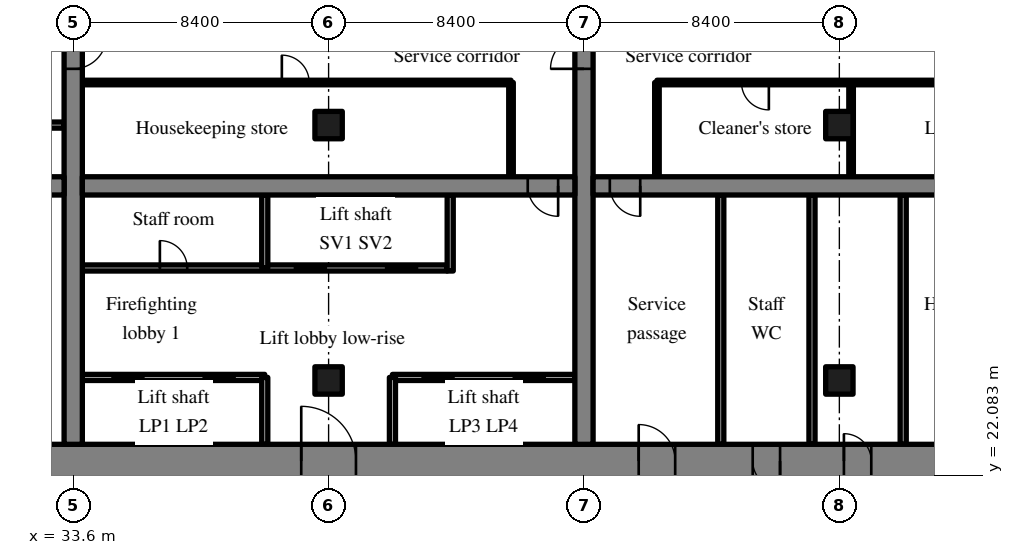
"""IFC4 building model, lengths in metres.
Left out: names, types, materials, properties, quantities, classifications, styles, units other than length and angle.
Written with IfcOpenShell. Run it as: python <this file> out.ifc"""

import sys

from ifc_helpers import new_model, si_unit, direction, frame, frame_2d, origin, origin_2d, place, context, subcontext, project, spatial, rectangle, extrude, source, transform, mapped, element, fill, save


model = new_model("IFC4")
c1 = context("Model", 3, precision=1e-05, world=origin(), true_north=direction((0.0, 1.0)))
c2 = subcontext(c1, "Body", "Model", "MODEL_VIEW")
j1 = project(units=[si_unit("LENGTHUNIT", "METRE"), si_unit("PLANEANGLEUNIT", "RADIAN")], contexts=[c1])
p1 = place(None, origin())
s1 = spatial("IfcSite", under=j1, at=p1, CompositionType="ELEMENT")
p2 = place(p1, origin())
s2 = spatial("IfcBuilding", under=s1, at=p2, CompositionType="ELEMENT")
p3 = place(p2, frame((0.0, 0.0, -9.0)))
s3 = spatial("IfcBuildingStorey", under=s2, at=p3, CompositionType="ELEMENT", Elevation=-9.0)
m1 = source(origin(), c2, "Body", "SweptSolid", [
    extrude(rectangle(XDim=50.4, YDim=1.1, at=frame_2d((25.2, 0.0))), origin(), (0.0, 0.0, 1.0), 4.22),
])
p4 = place(p3, frame((25.2, 22.55, 0.0), z_axis=(0.0, 0.0, 1.0), x_axis=(1.0, 0.0, 0.0)))
e1 = element("IfcWall", 1, at=p4, inside=s3, PredefinedType="SHEAR", context=c2, shape_type="MappedRepresentation", body=[
    mapped(m1, transform((0.0, 0.0, 0.0), scale=1.0)),
])
m2 = source(origin(), c2, "Body", "SweptSolid", [
    extrude(rectangle(XDim=1.8, YDim=2.1, at=frame_2d((0.9, 1.05))), frame((0.0, 0.56, 0.0), z_axis=(0.0, -1.0, 0.0), x_axis=(1.0, 0.0, 0.0)), (0.0, 0.0, 1.0), 1.12),
])
p5 = place(p4, frame((15.9, 0.0, 0.0)))
e2 = element("IfcOpeningElement", 2, at=p5, cuts=e1, PredefinedType="OPENING", context=c2, shape_type="MappedRepresentation", body=[
    mapped(m2, transform((0.0, 0.0, 0.0), scale=1.0)),
])
m3 = source(origin(), c2, "Body", "SweptSolid", [
    extrude(rectangle(XDim=1.2, YDim=2.1, at=frame_2d((0.6, 1.05))), frame((0.0, 0.56, 0.0), z_axis=(0.0, -1.0, 0.0), x_axis=(1.0, 0.0, 0.0)), (0.0, 0.0, 1.0), 1.12),
])
p6 = place(p4, frame((27.0, 0.0, 0.0)))
e3 = element("IfcOpeningElement", 3, at=p6, cuts=e1, PredefinedType="OPENING", context=c2, shape_type="MappedRepresentation", body=[
    mapped(m3, transform((0.0, 0.0, 0.0), scale=1.0)),
])
m4 = source(origin(), c2, "Body", "SweptSolid", [
    extrude(rectangle(XDim=0.9, YDim=2.1, at=frame_2d((0.45, 1.05))), frame((0.0, 0.56, 0.0), z_axis=(0.0, -1.0, 0.0), x_axis=(1.0, 0.0, 0.0)), (0.0, 0.0, 1.0), 1.12),
])
p7 = place(p4, frame((33.75, 0.0, 0.0)))
e4 = element("IfcOpeningElement", 4, at=p7, cuts=e1, PredefinedType="OPENING", context=c2, shape_type="MappedRepresentation", body=[
    mapped(m4, transform((0.0, 0.0, 0.0), scale=1.0)),
])
p8 = place(p4, frame((30.75, 0.0, 0.0)))
e5 = element("IfcOpeningElement", 5, at=p8, cuts=e1, PredefinedType="OPENING", context=c2, shape_type="MappedRepresentation", body=[
    mapped(m4, transform((0.0, 0.0, 0.0), scale=1.0)),
])
p9 = place(p4, frame((38.25, 0.0, 0.0)))
e6 = element("IfcOpeningElement", 6, at=p9, cuts=e1, PredefinedType="OPENING", context=c2, shape_type="MappedRepresentation", body=[
    mapped(m4, transform((0.0, 0.0, 0.0), scale=1.0)),
])
p10 = place(p4, frame((6.425, 0.0, 0.0)))
e7 = element("IfcOpeningElement", 7, at=p10, cuts=e1, PredefinedType="OPENING", context=c2, shape_type="MappedRepresentation", body=[
    mapped(m3, transform((0.0, 0.0, 0.0), scale=1.0)),
])
p11 = place(p4, frame((47.675, 0.0, 0.0)))
e8 = element("IfcOpeningElement", 8, at=p11, cuts=e1, PredefinedType="OPENING", context=c2, shape_type="MappedRepresentation", body=[
    mapped(m3, transform((0.0, 0.0, 0.0), scale=1.0)),
])
m5 = source(origin(), c2, "Body", "SweptSolid", [
    extrude(rectangle(XDim=17.8, YDim=0.6, at=frame_2d((8.9, 0.0))), origin(), (0.0, 0.0, 1.0), 4.22),
])
p12 = place(p3, frame((33.6, 23.1, 0.0), z_axis=(0.0, 0.0, 1.0), x_axis=(0.0, 1.0, 0.0)))
e9 = element("IfcWall", 9, at=p12, inside=s3, PredefinedType="SHEAR", context=c2, shape_type="MappedRepresentation", body=[
    mapped(m5, transform((0.0, 0.0, 0.0), scale=1.0)),
])
m6 = source(origin(), c2, "Body", "SweptSolid", [
    extrude(rectangle(XDim=1.1, YDim=2.1, at=frame_2d((0.55, 1.05))), frame((0.0, 0.31, 0.0), z_axis=(0.0, -1.0, 0.0), x_axis=(1.0, 0.0, 0.0)), (0.0, 0.0, 1.0), 0.62),
])
p13 = place(p12, frame((12.35, 0.0, 0.0)))
e10 = element("IfcOpeningElement", 10, at=p13, cuts=e9, PredefinedType="OPENING", context=c2, shape_type="MappedRepresentation", body=[
    mapped(m6, transform((0.0, 0.0, 0.0), scale=1.0)),
])
p14 = place(p3, frame((50.4, 23.1, 0.0), z_axis=(0.0, 0.0, 1.0), x_axis=(0.0, 1.0, 0.0)))
e11 = element("IfcWall", 11, at=p14, inside=s3, PredefinedType="SHEAR", context=c2, shape_type="MappedRepresentation", body=[
    mapped(m5, transform((0.0, 0.0, 0.0), scale=1.0)),
])
p15 = place(p14, frame((12.35, 0.0, 0.0)))
e12 = element("IfcOpeningElement", 12, at=p15, cuts=e11, PredefinedType="OPENING", context=c2, shape_type="MappedRepresentation", body=[
    mapped(m6, transform((0.0, 0.0, 0.0), scale=1.0)),
])
m7 = source(origin(), c2, "Body", "SweptSolid", [
    extrude(rectangle(XDim=7.0, YDim=0.6, at=frame_2d((3.5, 0.0))), origin(), (0.0, 0.0, 1.0), 4.22),
])
p16 = place(p3, frame((26.3, 31.6, 0.0), z_axis=(0.0, 0.0, 1.0), x_axis=(1.0, 0.0, 0.0)))
e13 = element("IfcWall", 13, at=p16, inside=s3, PredefinedType="SHEAR", context=c2, shape_type="MappedRepresentation", body=[
    mapped(m7, transform((0.0, 0.0, 0.0), scale=1.0)),
])
p17 = place(p16, frame((5.375, 0.0, 0.0)))
e14 = element("IfcOpeningElement", 14, at=p17, cuts=e13, PredefinedType="OPENING", context=c2, shape_type="MappedRepresentation", body=[
    mapped(m6, transform((0.0, 0.0, 0.0), scale=1.0)),
])
m8 = source(origin(), c2, "Body", "SweptSolid", [
    extrude(rectangle(XDim=16.2, YDim=0.6, at=frame_2d((8.1, 0.0))), origin(), (0.0, 0.0, 1.0), 4.22),
])
p18 = place(p3, frame((33.9, 31.6, 0.0), z_axis=(0.0, 0.0, 1.0), x_axis=(1.0, 0.0, 0.0)))
e15 = element("IfcWall", 15, at=p18, inside=s3, PredefinedType="SHEAR", context=c2, shape_type="MappedRepresentation", body=[
    mapped(m8, transform((0.0, 0.0, 0.0), scale=1.0)),
])
m9 = source(origin(), c2, "Body", "SweptSolid", [
    extrude(rectangle(XDim=1.0, YDim=2.1, at=frame_2d((0.5, 1.05))), frame((0.0, 0.31, 0.0), z_axis=(0.0, -1.0, 0.0), x_axis=(1.0, 0.0, 0.0)), (0.0, 0.0, 1.0), 0.62),
])
p19 = place(p18, frame((14.65, 0.0, 0.0)))
e16 = element("IfcOpeningElement", 16, at=p19, cuts=e15, PredefinedType="OPENING", context=c2, shape_type="MappedRepresentation", body=[
    mapped(m9, transform((0.0, 0.0, 0.0), scale=1.0)),
])
m10 = source(origin(), c2, "Body", "SweptSolid", [
    extrude(rectangle(XDim=16.2, YDim=0.6, at=frame_2d((8.1, 0.0))), origin(), (0.0, 0.0, 1.0), 4.22),
])
p20 = place(p3, frame((50.7, 31.6, 0.0), z_axis=(0.0, 0.0, 1.0), x_axis=(1.0, 0.0, 0.0)))
e17 = element("IfcWall", 17, at=p20, inside=s3, PredefinedType="SHEAR", context=c2, shape_type="MappedRepresentation", body=[
    mapped(m10, transform((0.0, 0.0, 0.0), scale=1.0)),
])
p21 = place(p20, frame((0.55, 0.0, 0.0)))
e18 = element("IfcOpeningElement", 18, at=p21, cuts=e17, PredefinedType="OPENING", context=c2, shape_type="MappedRepresentation", body=[
    mapped(m9, transform((0.0, 0.0, 0.0), scale=1.0)),
])
m11 = source(origin(), c2, "Body", "SweptSolid", [
    extrude(rectangle(XDim=0.9, YDim=0.9, at=origin_2d()), origin(), (0.0, 0.0, 1.0), 4.22),
])
for number, where, z_axis, x_axis in (
    (19, (42.0, 25.2, 0.0), (0.0, 0.0, 1.0), (1.0, 0.0, 0.0)),
    (20, (42.0, 33.6, 0.0), (0.0, 0.0, 1.0), (1.0, 0.0, 0.0)),
    (21, (58.8, 25.2, 0.0), (0.0, 0.0, 1.0), (1.0, 0.0, 0.0)),
    (22, (58.8, 33.6, 0.0), (0.0, 0.0, 1.0), (1.0, 0.0, 0.0)),
):
    element("IfcColumn", number, at=place(p3, frame(where, z_axis=z_axis, x_axis=x_axis)), inside=s3, PredefinedType="COLUMN", context=c2, shape_type="MappedRepresentation", body=[
        mapped(m11, transform((0.0, 0.0, 0.0), scale=1.0)),
    ])
m12 = source(origin(), c2, "Body", "SweptSolid", [
    extrude(rectangle(XDim=6.0, YDim=0.2, at=frame_2d((3.0, 0.0))), origin(), (0.0, 0.0, 1.0), 4.22),
])
p22 = place(p3, frame((33.9, 25.3, 0.0), z_axis=(0.0, 0.0, 1.0), x_axis=(1.0, 0.0, 0.0)))
e23 = element("IfcWall", 23, at=p22, inside=s3, PredefinedType="SOLIDWALL", context=c2, shape_type="MappedRepresentation", body=[
    mapped(m12, transform((0.0, 0.0, 0.0), scale=1.0)),
])
m13 = source(origin(), c2, "Body", "SweptSolid", [
    extrude(rectangle(XDim=1.1, YDim=2.1, at=frame_2d((0.55, 1.05))), frame((0.0, 0.11, 0.0), z_axis=(0.0, -1.0, 0.0), x_axis=(1.0, 0.0, 0.0)), (0.0, 0.0, 1.0), 0.22),
])
p23 = place(p22, frame((0.95, 0.0, 0.0)))
e24 = element("IfcOpeningElement", 24, at=p23, cuts=e23, PredefinedType="OPENING", context=c2, shape_type="MappedRepresentation", body=[
    mapped(m13, transform((0.0, 0.0, 0.0), scale=1.0)),
])
p24 = place(p22, frame((3.95, 0.0, 0.0)))
e25 = element("IfcOpeningElement", 25, at=p24, cuts=e23, PredefinedType="OPENING", context=c2, shape_type="MappedRepresentation", body=[
    mapped(m13, transform((0.0, 0.0, 0.0), scale=1.0)),
])
p25 = place(p3, frame((44.1, 25.3, 0.0), z_axis=(0.0, 0.0, 1.0), x_axis=(1.0, 0.0, 0.0)))
e26 = element("IfcWall", 26, at=p25, inside=s3, PredefinedType="SOLIDWALL", context=c2, shape_type="MappedRepresentation", body=[
    mapped(m12, transform((0.0, 0.0, 0.0), scale=1.0)),
])
p26 = place(p25, frame((0.95, 0.0, 0.0)))
e27 = element("IfcOpeningElement", 27, at=p26, cuts=e26, PredefinedType="OPENING", context=c2, shape_type="MappedRepresentation", body=[
    mapped(m13, transform((0.0, 0.0, 0.0), scale=1.0)),
])
p27 = place(p25, frame((3.95, 0.0, 0.0)))
e28 = element("IfcOpeningElement", 28, at=p27, cuts=e26, PredefinedType="OPENING", context=c2, shape_type="MappedRepresentation", body=[
    mapped(m13, transform((0.0, 0.0, 0.0), scale=1.0)),
])
m14 = source(origin(), c2, "Body", "SweptSolid", [
    extrude(rectangle(XDim=12.0, YDim=0.2, at=frame_2d((6.0, 0.0))), origin(), (0.0, 0.0, 1.0), 4.22),
])
p28 = place(p3, frame((33.9, 28.9, 0.0), z_axis=(0.0, 0.0, 1.0), x_axis=(1.0, 0.0, 0.0)))
e29 = element("IfcWall", 29, at=p28, inside=s3, PredefinedType="SOLIDWALL", context=c2, shape_type="MappedRepresentation", body=[
    mapped(m14, transform((0.0, 0.0, 0.0), scale=1.0)),
])
p29 = place(p28, frame((6.95, 0.0, 0.0)))
e30 = element("IfcOpeningElement", 30, at=p29, cuts=e29, PredefinedType="OPENING", context=c2, shape_type="MappedRepresentation", body=[
    mapped(m13, transform((0.0, 0.0, 0.0), scale=1.0)),
])
p30 = place(p28, frame((9.95, 0.0, 0.0)))
e31 = element("IfcOpeningElement", 31, at=p30, cuts=e29, PredefinedType="OPENING", context=c2, shape_type="MappedRepresentation", body=[
    mapped(m13, transform((0.0, 0.0, 0.0), scale=1.0)),
])
m15 = source(origin(), c2, "Body", "SweptSolid", [
    extrude(rectangle(XDim=0.9, YDim=2.1, at=frame_2d((0.45, 1.05))), frame((0.0, 0.11, 0.0), z_axis=(0.0, -1.0, 0.0), x_axis=(1.0, 0.0, 0.0)), (0.0, 0.0, 1.0), 0.22),
])
p31 = place(p28, frame((2.55, 0.0, 0.0)))
e32 = element("IfcOpeningElement", 32, at=p31, cuts=e29, PredefinedType="OPENING", context=c2, shape_type="MappedRepresentation", body=[
    mapped(m15, transform((0.0, 0.0, 0.0), scale=1.0)),
])
m16 = source(origin(), c2, "Body", "SweptSolid", [
    extrude(rectangle(XDim=2.2, YDim=0.2, at=frame_2d((1.1, 0.0))), origin(), (0.0, 0.0, 1.0), 4.22),
])
for number, where, z_axis, x_axis in (
    (33, (39.9, 23.1, 0.0), (0.0, 0.0, 1.0), (0.0, 1.0, 0.0)),
    (34, (44.1, 23.1, 0.0), (0.0, 0.0, 1.0), (0.0, 1.0, 0.0)),
):
    element("IfcWall", number, at=place(p3, frame(where, z_axis=z_axis, x_axis=x_axis)), inside=s3, PredefinedType="SOLIDWALL", context=c2, shape_type="MappedRepresentation", body=[
        mapped(m16, transform((0.0, 0.0, 0.0), scale=1.0)),
    ])
m17 = source(origin(), c2, "Body", "SweptSolid", [
    extrude(rectangle(XDim=2.5, YDim=0.2, at=frame_2d((1.25, 0.0))), origin(), (0.0, 0.0, 1.0), 4.22),
])
p32 = place(p3, frame((46.0, 28.8, 0.0), z_axis=(0.0, 0.0, 1.0), x_axis=(0.0, 1.0, 0.0)))
e35 = element("IfcWall", 35, at=p32, inside=s3, PredefinedType="SOLIDWALL", context=c2, shape_type="MappedRepresentation", body=[
    mapped(m17, transform((0.0, 0.0, 0.0), scale=1.0)),
])
m18 = source(origin(), c2, "Body", "SweptSolid", [
    extrude(rectangle(XDim=2.4, YDim=0.2, at=frame_2d((1.2, 0.0))), origin(), (0.0, 0.0, 1.0), 4.22),
])
p33 = place(p3, frame((39.9, 28.9, 0.0), z_axis=(0.0, 0.0, 1.0), x_axis=(0.0, 1.0, 0.0)))
e36 = element("IfcWall", 36, at=p33, inside=s3, PredefinedType="PARTITIONING", context=c2, shape_type="MappedRepresentation", body=[
    mapped(m18, transform((0.0, 0.0, 0.0), scale=1.0)),
])
m19 = source(origin(), c2, "Body", "SweptSolid", [
    extrude(rectangle(XDim=3.1, YDim=0.15, at=frame_2d((1.55, 0.0))), origin(), (0.0, 0.0, 1.0), 4.22),
])
p34 = place(p3, frame((48.0, 31.9, 0.0), z_axis=(0.0, 0.0, 1.0), x_axis=(0.0, 1.0, 0.0)))
e37 = element("IfcWall", 37, at=p34, inside=s3, PredefinedType="PARTITIONING", context=c2, shape_type="MappedRepresentation", body=[
    mapped(m19, transform((0.0, 0.0, 0.0), scale=1.0)),
])
m20 = source(origin(), c2, "Body", "SweptSolid", [
    extrude(rectangle(XDim=14.1, YDim=0.15, at=frame_2d((7.05, 0.0))), origin(), (0.0, 0.0, 1.0), 4.22),
])
p35 = place(p3, frame((33.9, 35.0, 0.0), z_axis=(0.0, 0.0, 1.0), x_axis=(1.0, 0.0, 0.0)))
e38 = element("IfcWall", 38, at=p35, inside=s3, PredefinedType="PARTITIONING", context=c2, shape_type="MappedRepresentation", body=[
    mapped(m20, transform((0.0, 0.0, 0.0), scale=1.0)),
])
m21 = source(origin(), c2, "Body", "SweptSolid", [
    extrude(rectangle(XDim=0.9, YDim=2.1, at=frame_2d((0.45, 1.05))), frame((0.0, 0.085, 0.0), z_axis=(0.0, -1.0, 0.0), x_axis=(1.0, 0.0, 0.0)), (0.0, 0.0, 1.0), 0.17),
])
p36 = place(p35, frame((6.562, 0.0, 0.0)))
e39 = element("IfcOpeningElement", 39, at=p36, cuts=e38, PredefinedType="OPENING", context=c2, shape_type="MappedRepresentation", body=[
    mapped(m21, transform((0.0, 0.0, 0.0), scale=1.0)),
])
m22 = source(origin(), c2, "Body", "SweptSolid", [
    extrude(rectangle(XDim=8.2, YDim=0.2, at=frame_2d((4.1, 0.0))), origin(), (0.0, 0.0, 1.0), 4.22),
])
for number, where, z_axis, x_axis in (
    (40, (54.9, 23.1, 0.0), (0.0, 0.0, 1.0), (0.0, 1.0, 0.0)),
    (41, (60.9, 23.1, 0.0), (0.0, 0.0, 1.0), (0.0, 1.0, 0.0)),
    (42, (57.9, 23.1, 0.0), (0.0, 0.0, 1.0), (0.0, 1.0, 0.0)),
):
    element("IfcWall", number, at=place(p3, frame(where, z_axis=z_axis, x_axis=x_axis)), inside=s3, PredefinedType="PARTITIONING", context=c2, shape_type="MappedRepresentation", body=[
        mapped(m22, transform((0.0, 0.0, 0.0), scale=1.0)),
    ])
p37 = place(p3, frame((52.8, 31.9, 0.0), z_axis=(0.0, 0.0, 1.0), x_axis=(0.0, 1.0, 0.0)))
e43 = element("IfcWall", 43, at=p37, inside=s3, PredefinedType="PARTITIONING", context=c2, shape_type="MappedRepresentation", body=[
    mapped(m19, transform((0.0, 0.0, 0.0), scale=1.0)),
])
m23 = source(origin(), c2, "Body", "SweptSolid", [
    extrude(rectangle(XDim=14.1, YDim=0.15, at=frame_2d((7.05, 0.0))), origin(), (0.0, 0.0, 1.0), 4.22),
])
p38 = place(p3, frame((66.9, 35.0, 0.0), z_axis=(0.0, 0.0, 1.0), x_axis=(-1.0, 0.0, 0.0)))
e44 = element("IfcWall", 44, at=p38, inside=s3, PredefinedType="PARTITIONING", context=c2, shape_type="MappedRepresentation", body=[
    mapped(m23, transform((0.0, 0.0, 0.0), scale=1.0)),
])
p39 = place(p38, frame((3.407, 0.0, 0.0)))
e45 = element("IfcOpeningElement", 45, at=p39, cuts=e44, PredefinedType="OPENING", context=c2, shape_type="MappedRepresentation", body=[
    mapped(m21, transform((0.0, 0.0, 0.0), scale=1.0)),
])
p40 = place(p38, frame((10.419, 0.0, 0.0)))
e46 = element("IfcOpeningElement", 46, at=p40, cuts=e44, PredefinedType="OPENING", context=c2, shape_type="MappedRepresentation", body=[
    mapped(m21, transform((0.0, 0.0, 0.0), scale=1.0)),
])
p41 = place(p3, frame((59.186, 31.9, 0.0), z_axis=(0.0, 0.0, 1.0), x_axis=(0.0, 1.0, 0.0)))
e47 = element("IfcWall", 47, at=p41, inside=s3, PredefinedType="PARTITIONING", context=c2, shape_type="MappedRepresentation", body=[
    mapped(m19, transform((0.0, 0.0, 0.0), scale=1.0)),
])
m24 = source(origin(), c2, "Body", "SweptSolid", [
    extrude(rectangle(XDim=2.15, YDim=0.2, at=frame_2d((1.075, 0.0))), origin(), (0.0, 0.0, 1.0), 4.22),
])
p42 = place(p3, frame((31.15, 33.6, 0.0), z_axis=(0.0, 0.0, 1.0), x_axis=(1.0, 0.0, 0.0)))
e48 = element("IfcWall", 48, at=p42, inside=s3, PredefinedType="SOLIDWALL", context=c2, shape_type="MappedRepresentation", body=[
    mapped(m24, transform((0.0, 0.0, 0.0), scale=1.0)),
])
m25 = source(origin(), c2, "Body", "SweptSolid", [
    extrude(rectangle(XDim=1.8, YDim=2.1, at=frame_2d((0.9, 1.05))), frame((0.0, 0.325, 0.0), z_axis=(0.0, -1.0, 0.0), x_axis=(1.0, 0.0, 0.0)), (0.0, 0.0, 1.0), 0.05),
])
p43 = place(p5, origin())
e49 = element("IfcDoor", 49, at=p43, inside=s3, OperationType="DOUBLE_DOOR_SINGLE_SWING", PredefinedType="DOOR", context=c2, shape_type="MappedRepresentation", body=[
    mapped(m25, transform((0.0, 0.0, 0.0), scale=1.0)),
])
fill(e2, e49)
m26 = source(origin(), c2, "Body", "SweptSolid", [
    extrude(rectangle(XDim=1.0, YDim=2.1, at=frame_2d((0.5, 1.05))), frame((0.0, 0.025, 0.0), z_axis=(0.0, -1.0, 0.0), x_axis=(1.0, 0.0, 0.0)), (0.0, 0.0, 1.0), 0.05),
])
p44 = place(p19, origin())
e50 = element("IfcDoor", 50, at=p44, inside=s3, OperationType="SINGLE_SWING_RIGHT", PredefinedType="DOOR", context=c2, shape_type="MappedRepresentation", body=[
    mapped(m26, transform((0.0, 0.0, 0.0), scale=1.0)),
])
fill(e16, e50)
m27 = source(origin(), c2, "Body", "SweptSolid", [
    extrude(rectangle(XDim=1.1, YDim=2.1, at=frame_2d((0.55, 1.05))), frame((0.0, 0.025, 0.0), z_axis=(0.0, -1.0, 0.0), x_axis=(1.0, 0.0, 0.0)), (0.0, 0.0, 1.0), 0.05),
])
p45 = place(p23, origin())
e51 = element("IfcDoor", 51, at=p45, inside=s3, OperationType="SLIDING_TO_LEFT", PredefinedType="DOOR", context=c2, shape_type="MappedRepresentation", body=[
    mapped(m27, transform((0.0, 0.0, 0.0), scale=1.0)),
])
fill(e24, e51)
p46 = place(p24, origin())
e52 = element("IfcDoor", 52, at=p46, inside=s3, OperationType="SLIDING_TO_RIGHT", PredefinedType="DOOR", context=c2, shape_type="MappedRepresentation", body=[
    mapped(m27, transform((0.0, 0.0, 0.0), scale=1.0)),
])
fill(e25, e52)
p47 = place(p26, origin())
e53 = element("IfcDoor", 53, at=p47, inside=s3, OperationType="SLIDING_TO_LEFT", PredefinedType="DOOR", context=c2, shape_type="MappedRepresentation", body=[
    mapped(m27, transform((0.0, 0.0, 0.0), scale=1.0)),
])
fill(e27, e53)
p48 = place(p27, origin())
e54 = element("IfcDoor", 54, at=p48, inside=s3, OperationType="SLIDING_TO_RIGHT", PredefinedType="DOOR", context=c2, shape_type="MappedRepresentation", body=[
    mapped(m27, transform((0.0, 0.0, 0.0), scale=1.0)),
])
fill(e28, e54)
p49 = place(p29, origin())
e55 = element("IfcDoor", 55, at=p49, inside=s3, OperationType="SLIDING_TO_LEFT", PredefinedType="DOOR", context=c2, shape_type="MappedRepresentation", body=[
    mapped(m27, transform((0.0, 0.0, 0.0), scale=1.0)),
])
fill(e30, e55)
p50 = place(p30, origin())
e56 = element("IfcDoor", 56, at=p50, inside=s3, OperationType="SLIDING_TO_RIGHT", PredefinedType="DOOR", context=c2, shape_type="MappedRepresentation", body=[
    mapped(m27, transform((0.0, 0.0, 0.0), scale=1.0)),
])
fill(e31, e56)
m28 = source(origin(), c2, "Body", "SweptSolid", [
    extrude(rectangle(XDim=0.9, YDim=2.1, at=frame_2d((0.45, 1.05))), frame((0.0, 0.025, 0.0), z_axis=(0.0, -1.0, 0.0), x_axis=(1.0, 0.0, 0.0)), (0.0, 0.0, 1.0), 0.05),
])
p51 = place(p31, origin())
e57 = element("IfcDoor", 57, at=p51, inside=s3, OperationType="SINGLE_SWING_LEFT", PredefinedType="DOOR", context=c2, shape_type="MappedRepresentation", body=[
    mapped(m28, transform((0.0, 0.0, 0.0), scale=1.0)),
])
fill(e32, e57)
p52 = place(p36, origin())
e58 = element("IfcDoor", 58, at=p52, inside=s3, OperationType="SINGLE_SWING_LEFT", PredefinedType="DOOR", context=c2, shape_type="MappedRepresentation", body=[
    mapped(m28, transform((0.0, 0.0, 0.0), scale=1.0)),
])
fill(e39, e58)
m29 = source(origin(), c2, "Body", "SweptSolid", [
    extrude(rectangle(XDim=1.2, YDim=2.1, at=frame_2d((0.6, 1.05))), frame((0.0, 0.325, 0.0), z_axis=(0.0, -1.0, 0.0), x_axis=(1.0, 0.0, 0.0)), (0.0, 0.0, 1.0), 0.05),
])
p53 = place(p6, origin())
e59 = element("IfcDoor", 59, at=p53, inside=s3, OperationType="SINGLE_SWING_LEFT", PredefinedType="DOOR", context=c2, shape_type="MappedRepresentation", body=[
    mapped(m29, transform((0.0, 0.0, 0.0), scale=1.0)),
])
fill(e3, e59)
p54 = place(p21, origin())
e60 = element("IfcDoor", 60, at=p54, inside=s3, OperationType="SINGLE_SWING_RIGHT", PredefinedType="DOOR", context=c2, shape_type="MappedRepresentation", body=[
    mapped(m26, transform((0.0, 0.0, 0.0), scale=1.0)),
])
fill(e18, e60)
m30 = source(origin(), c2, "Body", "SweptSolid", [
    extrude(rectangle(XDim=0.9, YDim=2.1, at=frame_2d((0.45, 1.05))), frame((0.0, 0.325, 0.0), z_axis=(0.0, -1.0, 0.0), x_axis=(1.0, 0.0, 0.0)), (0.0, 0.0, 1.0), 0.05),
])
p55 = place(p7, origin())
e61 = element("IfcDoor", 61, at=p55, inside=s3, OperationType="SINGLE_SWING_LEFT", PredefinedType="DOOR", context=c2, shape_type="MappedRepresentation", body=[
    mapped(m30, transform((0.0, 0.0, 0.0), scale=1.0)),
])
fill(e4, e61)
p56 = place(p8, origin())
e62 = element("IfcDoor", 62, at=p56, inside=s3, OperationType="SINGLE_SWING_RIGHT", PredefinedType="DOOR", context=c2, shape_type="MappedRepresentation", body=[
    mapped(m30, transform((0.0, 0.0, 0.0), scale=1.0)),
])
fill(e5, e62)
p57 = place(p40, origin())
e63 = element("IfcDoor", 63, at=p57, inside=s3, OperationType="SINGLE_SWING_LEFT", PredefinedType="DOOR", context=c2, shape_type="MappedRepresentation", body=[
    mapped(m28, transform((0.0, 0.0, 0.0), scale=1.0)),
])
fill(e46, e63)
p58 = place(p13, origin())
e64 = element("IfcDoor", 64, at=p58, inside=s3, OperationType="SINGLE_SWING_RIGHT", PredefinedType="DOOR", context=c2, shape_type="MappedRepresentation", body=[
    mapped(m27, transform((0.0, 0.0, 0.0), scale=1.0)),
])
fill(e10, e64)
p59 = place(p15, origin())
e65 = element("IfcDoor", 65, at=p59, inside=s3, OperationType="SINGLE_SWING_LEFT", PredefinedType="DOOR", context=c2, shape_type="MappedRepresentation", body=[
    mapped(m27, transform((0.0, 0.0, 0.0), scale=1.0)),
])
fill(e12, e65)
save(model, sys.argv[1])
